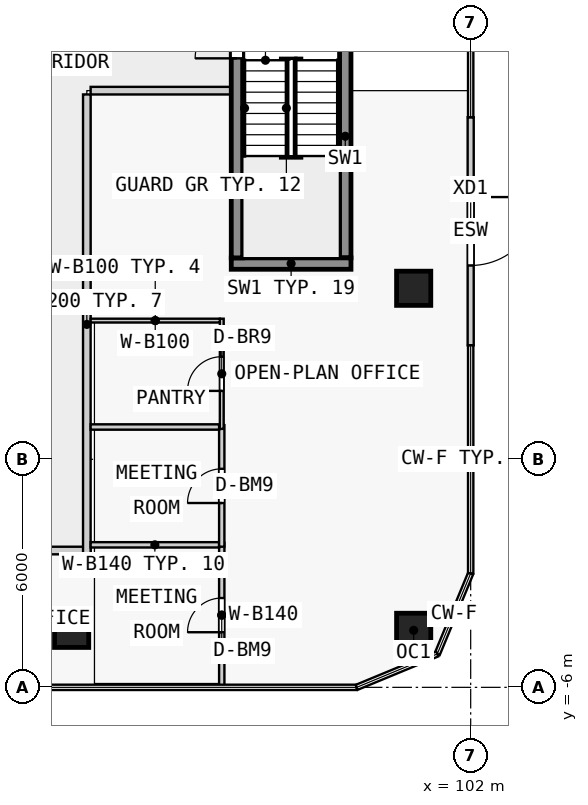
"""IFC4 building model, lengths in metres.
Left out: names, types, materials, properties, quantities, classifications, styles, units other than length and angle.
Written with IfcOpenShell. Run it as: python <this file> out.ifc"""

import sys

from ifc_helpers import new_model, si_unit, direction, frame, frame_2d, origin, origin_2d, place, context, subcontext, project, spatial, rectangle, extrude, element, fill, save


model = new_model("IFC4")
c1 = context("Model", 3, precision=1e-05, world=origin(), true_north=direction((0.0, 1.0)))
c2 = subcontext(c1, "Body", "Model", "MODEL_VIEW")
j1 = project(units=[si_unit("LENGTHUNIT", "METRE"), si_unit("PLANEANGLEUNIT", "RADIAN")], contexts=[c1])
p1 = place(None, origin())
s1 = spatial("IfcSite", under=j1, at=p1, CompositionType="ELEMENT")
p2 = place(p1, origin())
s2 = spatial("IfcBuilding", under=s1, at=p2, CompositionType="ELEMENT")
p3 = place(p2, frame((0.0, 0.0, 26.8)))
s3 = spatial("IfcBuildingStorey", under=s2, at=p3, CompositionType="ELEMENT", Elevation=26.8)
for number, where, z_axis, x_axis in (
    (1, (91.5, -4.5, 0.0), (0.0, 0.0, 1.0), (1.0, 0.0, 0.0)),
    (2, (100.5, -4.5, 0.0), (0.0, 0.0, 1.0), (1.0, 0.0, 0.0)),
    (3, (100.5, 4.5, 0.0), (0.0, 0.0, 1.0), (1.0, 0.0, 0.0)),
):
    element("IfcColumn", number, at=place(p3, frame(where, z_axis=z_axis, x_axis=x_axis)), inside=s3, PredefinedType="COLUMN", context=c2, shape_type="SweptSolid", body=[
        extrude(rectangle(XDim=0.9, YDim=0.9, at=origin_2d()), origin(), (0.0, 0.0, 1.0), 3.5),
    ])
p4 = place(p3, frame((95.85, 5.3, 0.0), z_axis=(0.0, 0.0, 1.0), x_axis=(0.0, 1.0, 0.0)))
e4 = element("IfcWall", 4, at=p4, inside=s3, PredefinedType="SHEAR", context=c2, shape_type="SweptSolid", body=[
    extrude(rectangle(XDim=6.4, YDim=0.3, at=frame_2d((3.2, 0.0))), origin(), (0.0, 0.0, 1.0), 3.25),
])
p5 = place(p4, frame((5.25, 0.0, 0.0)))
e5 = element("IfcOpeningElement", 5, at=p5, cuts=e4, PredefinedType="OPENING", context=c2, shape_type="SweptSolid", body=[
    extrude(rectangle(XDim=1.1, YDim=2.1, at=frame_2d((0.55, 1.05))), frame((0.0, 0.16, 0.0), z_axis=(0.0, -1.0, 0.0), x_axis=(1.0, 0.0, 0.0)), (0.0, 0.0, 1.0), 0.32),
])
p6 = place(p3, frame((98.7, 5.3, 0.0), z_axis=(0.0, 0.0, 1.0), x_axis=(0.0, 1.0, 0.0)))
e6 = element("IfcWall", 6, at=p6, inside=s3, PredefinedType="SHEAR", context=c2, shape_type="SweptSolid", body=[
    extrude(rectangle(XDim=6.4, YDim=0.3, at=frame_2d((3.2, 0.0))), origin(), (0.0, 0.0, 1.0), 3.25),
])
p7 = place(p3, frame((95.7, 5.15, 0.0), z_axis=(0.0, 0.0, 1.0), x_axis=(1.0, 0.0, 0.0)))
e7 = element("IfcWall", 7, at=p7, inside=s3, PredefinedType="SHEAR", context=c2, shape_type="SweptSolid", body=[
    extrude(rectangle(XDim=3.15, YDim=0.3, at=frame_2d((1.575, 0.0))), origin(), (0.0, 0.0, 1.0), 3.25),
])
p8 = place(p3, frame((102.0, 9.0, 0.0), z_axis=(0.0, 0.0, 1.0), x_axis=(0.0, -1.0, 0.0)))
e8 = element("IfcWall", 8, at=p8, inside=s3, PredefinedType="STANDARD", context=c2, shape_type="SweptSolid", body=[
    extrude(rectangle(XDim=6.0, YDim=0.16, at=frame_2d((3.0, 0.0))), origin(), (0.0, 0.0, 1.0), 3.25),
])
p9 = place(p8, frame((2.1, 0.0, 0.0)))
e9 = element("IfcOpeningElement", 9, at=p9, cuts=e8, PredefinedType="OPENING", context=c2, shape_type="SweptSolid", body=[
    extrude(rectangle(XDim=1.8, YDim=2.4, at=frame_2d((0.9, 1.2))), frame((0.0, 0.09, 0.0), z_axis=(0.0, -1.0, 0.0), x_axis=(1.0, 0.0, 0.0)), (0.0, 0.0, 1.0), 0.18),
])
p10 = place(p3, frame((72.0, -2.4, 0.0), z_axis=(0.0, 0.0, 1.0), x_axis=(1.0, 0.0, 0.0)))
e10 = element("IfcWall", 10, at=p10, inside=s3, PredefinedType="PARTITIONING", context=c2, shape_type="SweptSolid", body=[
    extrude(rectangle(XDim=20.0, YDim=0.2, at=frame_2d((10.0, 0.0))), origin(), (0.0, 0.0, 1.0), 3.25),
])
p11 = place(p10, frame((11.1, 0.0, 0.0)))
e11 = element("IfcOpeningElement", 11, at=p11, cuts=e10, PredefinedType="OPENING", context=c2, shape_type="SweptSolid", body=[
    extrude(rectangle(XDim=1.8, YDim=2.1, at=frame_2d((0.9, 1.05))), frame((0.0, 0.11, 0.0), z_axis=(0.0, -1.0, 0.0), x_axis=(1.0, 0.0, 0.0)), (0.0, 0.0, 1.0), 0.22),
])
p12 = place(p3, frame((91.9, -2.5, 0.0), z_axis=(0.0, 0.0, 1.0), x_axis=(0.0, 1.0, 0.0)))
e12 = element("IfcWall", 12, at=p12, inside=s3, PredefinedType="PARTITIONING", context=c2, shape_type="SweptSolid", body=[
    extrude(rectangle(XDim=12.1, YDim=0.2, at=frame_2d((6.05, 0.0))), origin(), (0.0, 0.0, 1.0), 3.25),
])
p13 = place(p3, frame((92.0, 9.7, 0.0), z_axis=(0.0, 0.0, 1.0), x_axis=(1.0, 0.0, 0.0)))
e13 = element("IfcWall", 13, at=p13, inside=s3, PredefinedType="PARTITIONING", context=c2, shape_type="SweptSolid", body=[
    extrude(rectangle(XDim=3.7, YDim=0.2, at=frame_2d((1.85, 0.0))), origin(), (0.0, 0.0, 1.0), 3.25),
])
p14 = place(p3, frame((95.45, -6.0, 0.0), z_axis=(0.0, 0.0, 1.0), x_axis=(0.0, 1.0, 0.0)))
e14 = element("IfcWall", 14, at=p14, inside=s3, PredefinedType="PARTITIONING", context=c2, shape_type="SweptSolid", body=[
    extrude(rectangle(XDim=3.8, YDim=0.14, at=frame_2d((1.9, 0.0))), origin(), (0.0, 0.0, 1.0), 3.25),
])
p15 = place(p14, frame((1.45, 0.0, 0.0)))
e15 = element("IfcOpeningElement", 15, at=p15, cuts=e14, PredefinedType="OPENING", context=c2, shape_type="SweptSolid", body=[
    extrude(rectangle(XDim=0.9, YDim=2.4, at=frame_2d((0.45, 1.2))), frame((0.0, 0.08, 0.0), z_axis=(0.0, -1.0, 0.0), x_axis=(1.0, 0.0, 0.0)), (0.0, 0.0, 1.0), 0.16),
])
p16 = place(p3, frame((92.0, -2.25, 0.0), z_axis=(0.0, 0.0, 1.0), x_axis=(1.0, 0.0, 0.0)))
e16 = element("IfcWall", 16, at=p16, inside=s3, PredefinedType="PARTITIONING", context=c2, shape_type="SweptSolid", body=[
    extrude(rectangle(XDim=3.38, YDim=0.14, at=frame_2d((1.69, 0.0))), origin(), (0.0, 0.0, 1.0), 3.25),
])
p17 = place(p3, frame((95.45, -2.3, 0.0), z_axis=(0.0, 0.0, 1.0), x_axis=(0.0, 1.0, 0.0)))
e17 = element("IfcWall", 17, at=p17, inside=s3, PredefinedType="PARTITIONING", context=c2, shape_type="SweptSolid", body=[
    extrude(rectangle(XDim=3.2, YDim=0.14, at=frame_2d((1.6, 0.0))), origin(), (0.0, 0.0, 1.0), 3.25),
])
p18 = place(p17, frame((1.15, 0.0, 0.0)))
e18 = element("IfcOpeningElement", 18, at=p18, cuts=e17, PredefinedType="OPENING", context=c2, shape_type="SweptSolid", body=[
    extrude(rectangle(XDim=0.9, YDim=2.4, at=frame_2d((0.45, 1.2))), frame((0.0, 0.08, 0.0), z_axis=(0.0, -1.0, 0.0), x_axis=(1.0, 0.0, 0.0)), (0.0, 0.0, 1.0), 0.16),
])
p19 = place(p3, frame((92.0, 0.85, 0.0), z_axis=(0.0, 0.0, 1.0), x_axis=(1.0, 0.0, 0.0)))
e19 = element("IfcWall", 19, at=p19, inside=s3, PredefinedType="PARTITIONING", context=c2, shape_type="SweptSolid", body=[
    extrude(rectangle(XDim=3.38, YDim=0.14, at=frame_2d((1.69, 0.0))), origin(), (0.0, 0.0, 1.0), 3.25),
])
p20 = place(p3, frame((95.45, 0.8, 0.0), z_axis=(0.0, 0.0, 1.0), x_axis=(0.0, 1.0, 0.0)))
e20 = element("IfcWall", 20, at=p20, inside=s3, PredefinedType="PARTITIONING", context=c2, shape_type="SweptSolid", body=[
    extrude(rectangle(XDim=2.9, YDim=0.1, at=frame_2d((1.45, 0.0))), origin(), (0.0, 0.0, 1.0), 3.25),
])
p21 = place(p20, frame((1.0, 0.0, 0.0)))
e21 = element("IfcOpeningElement", 21, at=p21, cuts=e20, PredefinedType="OPENING", context=c2, shape_type="SweptSolid", body=[
    extrude(rectangle(XDim=0.9, YDim=2.1, at=frame_2d((0.45, 1.05))), frame((0.0, 0.06, 0.0), z_axis=(0.0, -1.0, 0.0), x_axis=(1.0, 0.0, 0.0)), (0.0, 0.0, 1.0), 0.12),
])
p22 = place(p3, frame((92.0, 3.65, 0.0), z_axis=(0.0, 0.0, 1.0), x_axis=(1.0, 0.0, 0.0)))
e22 = element("IfcWall", 22, at=p22, inside=s3, PredefinedType="PARTITIONING", context=c2, shape_type="SweptSolid", body=[
    extrude(rectangle(XDim=3.4, YDim=0.1, at=frame_2d((1.7, 0.0))), origin(), (0.0, 0.0, 1.0), 3.25),
])
p23 = place(p9, origin())
e23 = element("IfcDoor", 23, at=p23, inside=s3, OperationType="SINGLE_SWING_LEFT", PredefinedType="DOOR", context=c2, shape_type="SweptSolid", body=[
    extrude(rectangle(XDim=1.8, YDim=2.4, at=frame_2d((0.9, 1.2))), frame((0.0, 0.025, 0.0), z_axis=(0.0, -1.0, 0.0), x_axis=(1.0, 0.0, 0.0)), (0.0, 0.0, 1.0), 0.05),
])
fill(e9, e23)
p24 = place(p5, origin())
e24 = element("IfcDoor", 24, at=p24, inside=s3, OperationType="SINGLE_SWING_LEFT", PredefinedType="DOOR", context=c2, shape_type="SweptSolid", body=[
    extrude(rectangle(XDim=1.1, YDim=2.1, at=frame_2d((0.55, 1.05))), frame((0.0, 0.025, 0.0), z_axis=(0.0, -1.0, 0.0), x_axis=(1.0, 0.0, 0.0)), (0.0, 0.0, 1.0), 0.05),
])
fill(e5, e24)
p25 = place(p15, origin())
e25 = element("IfcDoor", 25, at=p25, inside=s3, OperationType="SINGLE_SWING_LEFT", PredefinedType="DOOR", context=c2, shape_type="SweptSolid", body=[
    extrude(rectangle(XDim=0.9, YDim=2.4, at=frame_2d((0.45, 1.2))), frame((0.0, 0.025, 0.0), z_axis=(0.0, -1.0, 0.0), x_axis=(1.0, 0.0, 0.0)), (0.0, 0.0, 1.0), 0.05),
])
fill(e15, e25)
p26 = place(p18, origin())
e26 = element("IfcDoor", 26, at=p26, inside=s3, OperationType="SINGLE_SWING_LEFT", PredefinedType="DOOR", context=c2, shape_type="SweptSolid", body=[
    extrude(rectangle(XDim=0.9, YDim=2.4, at=frame_2d((0.45, 1.2))), frame((0.0, 0.025, 0.0), z_axis=(0.0, -1.0, 0.0), x_axis=(1.0, 0.0, 0.0)), (0.0, 0.0, 1.0), 0.05),
])
fill(e18, e26)
p27 = place(p21, origin())
e27 = element("IfcDoor", 27, at=p27, inside=s3, OperationType="SINGLE_SWING_LEFT", PredefinedType="DOOR", context=c2, shape_type="SweptSolid", body=[
    extrude(rectangle(XDim=0.9, YDim=2.1, at=frame_2d((0.45, 1.05))), frame((0.0, 0.025, 0.0), z_axis=(0.0, -1.0, 0.0), x_axis=(1.0, 0.0, 0.0)), (0.0, 0.0, 1.0), 0.05),
])
fill(e21, e27)
save(model, sys.argv[1])
